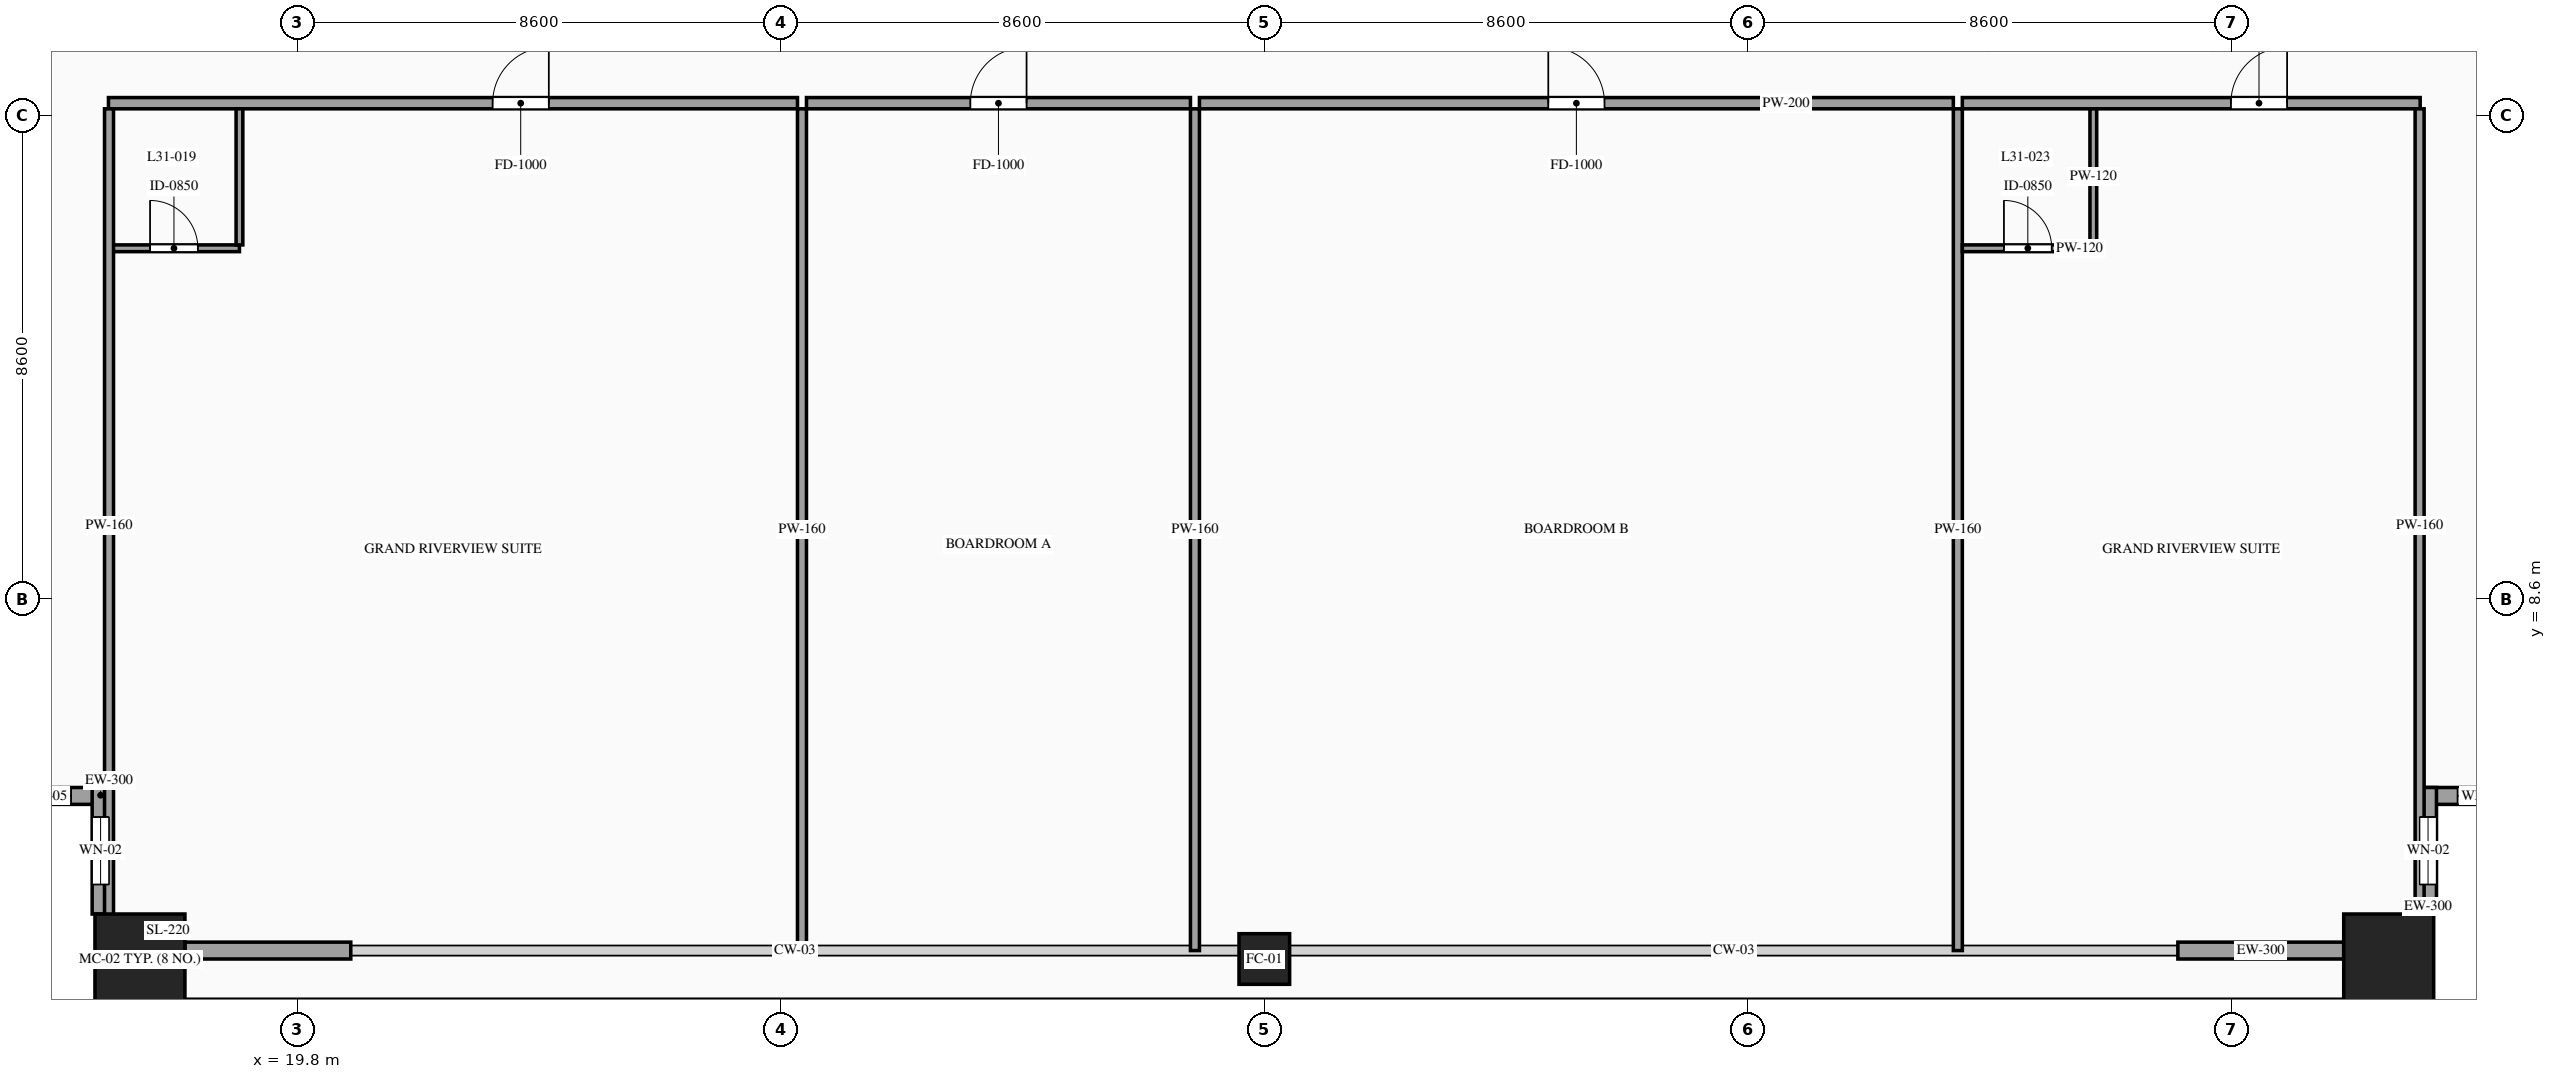
"""IFC4 building model, lengths in metres.
Left out: names, types, materials, properties, quantities, classifications, styles, units other than length and angle.
Written with IfcOpenShell. Run it as: python <this file> out.ifc"""

import sys

from ifc_helpers import new_model, si_unit, direction, frame, frame_2d, origin, origin_2d, place, context, subcontext, project, spatial, rectangle, hollow_rectangle, extrude, source, transform, mapped, element, fill, save


model = new_model("IFC4")
c1 = context("Model", 3, precision=1e-05, world=origin(), true_north=direction((0.0, 1.0)))
c2 = subcontext(c1, "Body", "Model", "MODEL_VIEW")
j1 = project(units=[si_unit("LENGTHUNIT", "METRE"), si_unit("PLANEANGLEUNIT", "RADIAN")], contexts=[c1])
p1 = place(None, origin())
s1 = spatial("IfcSite", under=j1, at=p1, CompositionType="ELEMENT")
p2 = place(p1, origin())
s2 = spatial("IfcBuilding", under=s1, at=p2, CompositionType="ELEMENT")
p3 = place(p2, frame((0.0, 0.0, 119.0)))
s3 = spatial("IfcBuildingStorey", under=s2, at=p3, CompositionType="ELEMENT", Elevation=119.0)
m1 = source(origin(), c2, "Body", "SweptSolid", [
    extrude(hollow_rectangle(XDim=1.6, YDim=1.6, WallThickness=0.07, at=origin_2d()), origin(), (0.0, 0.0, 1.0), 3.6),
])
p4 = place(p3, frame((17.0, 2.2, 0.0), z_axis=(0.0, 0.0, 1.0), x_axis=(1.0, 0.0, 0.0)))
e1 = element("IfcColumn", 1, at=p4, inside=s3, PredefinedType="COLUMN", context=c2, shape_type="MappedRepresentation", body=[
    mapped(m1, transform((0.0, 0.0, 0.0), scale=1.0)),
])
m2 = source(origin(), c2, "Body", "SweptSolid", [
    extrude(hollow_rectangle(XDim=0.9, YDim=0.9, WallThickness=0.042, at=origin_2d()), origin(), (0.0, 0.0, 1.0), 3.6),
])
p5 = place(p3, frame((37.0, 2.2, 0.0), z_axis=(0.0, 0.0, 1.0), x_axis=(1.0, 0.0, 0.0)))
e2 = element("IfcColumn", 2, at=p5, inside=s3, PredefinedType="COLUMN", context=c2, shape_type="MappedRepresentation", body=[
    mapped(m2, transform((0.0, 0.0, 0.0), scale=1.0)),
])
p6 = place(p3, frame((57.0, 2.2, 0.0), z_axis=(0.0, 0.0, 1.0), x_axis=(1.0, 0.0, 0.0)))
e3 = element("IfcColumn", 3, at=p6, inside=s3, PredefinedType="COLUMN", context=c2, shape_type="MappedRepresentation", body=[
    mapped(m1, transform((0.0, 0.0, 0.0), scale=1.0)),
])
p7 = place(p3, frame((14.2, 5.1, 0.0), z_axis=(0.0, 0.0, 1.0), x_axis=(1.0, 0.0, 0.0)))
e4 = element("IfcWall", 4, at=p7, inside=s3, PredefinedType="SOLIDWALL", context=c2, shape_type="SweptSolid", body=[
    extrude(rectangle(XDim=2.25, YDim=0.3, at=frame_2d((1.125, 0.0))), origin(), (0.0, 0.0, 1.0), 3.38),
])
p8 = place(p7, frame((0.675, 0.0, 0.85)))
e5 = element("IfcOpeningElement", 5, at=p8, cuts=e4, PredefinedType="OPENING", context=c2, shape_type="SweptSolid", body=[
    extrude(rectangle(XDim=0.9, YDim=1.5, at=frame_2d((0.45, 0.75))), frame((0.0, 0.165, 0.0), z_axis=(0.0, -1.0, 0.0), x_axis=(1.0, 0.0, 0.0)), (0.0, 0.0, 1.0), 0.33),
])
p9 = place(p3, frame((16.3, 5.25, 0.0), z_axis=(0.0, 0.0, 1.0), x_axis=(0.0, -1.0, 0.0)))
e6 = element("IfcWall", 6, at=p9, inside=s3, PredefinedType="SOLIDWALL", context=c2, shape_type="SweptSolid", body=[
    extrude(rectangle(XDim=2.25, YDim=0.3, at=frame_2d((1.125, 0.0))), origin(), (0.0, 0.0, 1.0), 3.38),
])
p10 = place(p9, frame((0.525, 0.0, 0.85)))
e7 = element("IfcOpeningElement", 7, at=p10, cuts=e6, PredefinedType="OPENING", context=c2, shape_type="SweptSolid", body=[
    extrude(rectangle(XDim=1.2, YDim=2.1, at=frame_2d((0.6, 1.05))), frame((0.0, 0.165, 0.0), z_axis=(0.0, -1.0, 0.0), x_axis=(1.0, 0.0, 0.0)), (0.0, 0.0, 1.0), 0.33),
])
p11 = place(p3, frame((57.55, 5.1, 0.0), z_axis=(0.0, 0.0, 1.0), x_axis=(1.0, 0.0, 0.0)))
e8 = element("IfcWall", 8, at=p11, inside=s3, PredefinedType="SOLIDWALL", context=c2, shape_type="SweptSolid", body=[
    extrude(rectangle(XDim=2.25, YDim=0.3, at=frame_2d((1.125, 0.0))), origin(), (0.0, 0.0, 1.0), 3.38),
])
p12 = place(p11, frame((0.675, 0.0, 0.85)))
e9 = element("IfcOpeningElement", 9, at=p12, cuts=e8, PredefinedType="OPENING", context=c2, shape_type="SweptSolid", body=[
    extrude(rectangle(XDim=0.9, YDim=1.5, at=frame_2d((0.45, 0.75))), frame((0.0, 0.165, 0.0), z_axis=(0.0, -1.0, 0.0), x_axis=(1.0, 0.0, 0.0)), (0.0, 0.0, 1.0), 0.33),
])
p13 = place(p3, frame((57.7, 3.0, 0.0), z_axis=(0.0, 0.0, 1.0), x_axis=(0.0, 1.0, 0.0)))
e10 = element("IfcWall", 10, at=p13, inside=s3, PredefinedType="SOLIDWALL", context=c2, shape_type="SweptSolid", body=[
    extrude(rectangle(XDim=2.25, YDim=0.3, at=frame_2d((1.125, 0.0))), origin(), (0.0, 0.0, 1.0), 3.38),
])
p14 = place(p13, frame((0.525, 0.0, 0.85)))
e11 = element("IfcOpeningElement", 11, at=p14, cuts=e10, PredefinedType="OPENING", context=c2, shape_type="SweptSolid", body=[
    extrude(rectangle(XDim=1.2, YDim=2.1, at=frame_2d((0.6, 1.05))), frame((0.0, 0.165, 0.0), z_axis=(0.0, -1.0, 0.0), x_axis=(1.0, 0.0, 0.0)), (0.0, 0.0, 1.0), 0.33),
])
m3 = source(origin(), c2, "Body", "SweptSolid", [
    extrude(rectangle(XDim=2.95, YDim=0.3, at=frame_2d((1.475, 0.0))), origin(), (0.0, 0.0, 1.0), 2.775),
])
for number, where, z_axis, x_axis in (
    (12, (17.8, 2.35, 0.0), (0.0, 0.0, 1.0), (1.0, 0.0, 0.0)),
    (13, (53.25, 2.35, 0.0), (0.0, 0.0, 1.0), (1.0, 0.0, 0.0)),
):
    element("IfcWall", number, at=place(p3, frame(where, z_axis=z_axis, x_axis=x_axis)), inside=s3, PredefinedType="SOLIDWALL", context=c2, shape_type="MappedRepresentation", body=[
        mapped(m3, transform((0.0, 0.0, 0.0), scale=1.0)),
    ])
p15 = place(p3, frame((16.44, 17.42, 0.0), z_axis=(0.0, 0.0, 1.0), x_axis=(1.0, 0.0, 0.0)))
e14 = element("IfcWall", 14, at=p15, inside=s3, PredefinedType="PARTITIONING", context=c2, shape_type="SweptSolid", body=[
    extrude(rectangle(XDim=12.256, YDim=0.2, at=frame_2d((6.128, 0.0))), origin(), (0.0, 0.0, 1.0), 3.38),
])
p16 = place(p15, frame((6.833, 0.0, 0.0)))
e15 = element("IfcOpeningElement", 15, at=p16, cuts=e14, PredefinedType="OPENING", context=c2, shape_type="SweptSolid", body=[
    extrude(rectangle(XDim=1.0, YDim=2.2, at=frame_2d((0.5, 1.1))), frame((0.0, 0.115, 0.0), z_axis=(0.0, -1.0, 0.0), x_axis=(1.0, 0.0, 0.0)), (0.0, 0.0, 1.0), 0.23),
])
m4 = source(origin(), c2, "Body", "SweptSolid", [
    extrude(rectangle(XDim=14.97, YDim=0.16, at=frame_2d((7.485, 0.0))), origin(), (0.0, 0.0, 1.0), 3.38),
])
p17 = place(p3, frame((28.776, 2.35, 0.0), z_axis=(0.0, 0.0, 1.0), x_axis=(0.0, 1.0, 0.0)))
e16 = element("IfcWall", 16, at=p17, inside=s3, PredefinedType="PARTITIONING", context=c2, shape_type="MappedRepresentation", body=[
    mapped(m4, transform((0.0, 0.0, 0.0), scale=1.0)),
])
p18 = place(p3, frame((16.44, 14.84, 0.0), z_axis=(0.0, 0.0, 1.0), x_axis=(1.0, 0.0, 0.0)))
e17 = element("IfcWall", 17, at=p18, inside=s3, PredefinedType="PARTITIONING", context=c2, shape_type="SweptSolid", body=[
    extrude(rectangle(XDim=2.33, YDim=0.12, at=frame_2d((1.165, 0.0))), origin(), (0.0, 0.0, 1.0), 3.38),
])
p19 = place(p18, frame((0.74, 0.0, 0.0)))
e18 = element("IfcOpeningElement", 18, at=p19, cuts=e17, PredefinedType="OPENING", context=c2, shape_type="SweptSolid", body=[
    extrude(rectangle(XDim=0.85, YDim=2.1, at=frame_2d((0.425, 1.05))), frame((0.0, 0.075, 0.0), z_axis=(0.0, -1.0, 0.0), x_axis=(1.0, 0.0, 0.0)), (0.0, 0.0, 1.0), 0.15),
])
m5 = source(origin(), c2, "Body", "SweptSolid", [
    extrude(rectangle(XDim=2.42, YDim=0.12, at=frame_2d((1.21, 0.0))), origin(), (0.0, 0.0, 1.0), 3.38),
])
p20 = place(p3, frame((18.77, 14.9, 0.0), z_axis=(0.0, 0.0, 1.0), x_axis=(0.0, 1.0, 0.0)))
e19 = element("IfcWall", 19, at=p20, inside=s3, PredefinedType="PARTITIONING", context=c2, shape_type="MappedRepresentation", body=[
    mapped(m5, transform((0.0, 0.0, 0.0), scale=1.0)),
])
p21 = place(p3, frame((28.856, 17.42, 0.0), z_axis=(0.0, 0.0, 1.0), x_axis=(1.0, 0.0, 0.0)))
e20 = element("IfcWall", 20, at=p21, inside=s3, PredefinedType="PARTITIONING", context=c2, shape_type="SweptSolid", body=[
    extrude(rectangle(XDim=6.83, YDim=0.2, at=frame_2d((3.415, 0.0))), origin(), (0.0, 0.0, 1.0), 3.38),
])
p22 = place(p21, frame((2.915, 0.0, 0.0)))
e21 = element("IfcOpeningElement", 21, at=p22, cuts=e20, PredefinedType="OPENING", context=c2, shape_type="SweptSolid", body=[
    extrude(rectangle(XDim=1.0, YDim=2.2, at=frame_2d((0.5, 1.1))), frame((0.0, 0.115, 0.0), z_axis=(0.0, -1.0, 0.0), x_axis=(1.0, 0.0, 0.0)), (0.0, 0.0, 1.0), 0.23),
])
p23 = place(p3, frame((35.766, 2.35, 0.0), z_axis=(0.0, 0.0, 1.0), x_axis=(0.0, 1.0, 0.0)))
e22 = element("IfcWall", 22, at=p23, inside=s3, PredefinedType="PARTITIONING", context=c2, shape_type="MappedRepresentation", body=[
    mapped(m4, transform((0.0, 0.0, 0.0), scale=1.0)),
])
p24 = place(p3, frame((35.846, 17.42, 0.0), z_axis=(0.0, 0.0, 1.0), x_axis=(1.0, 0.0, 0.0)))
e23 = element("IfcWall", 23, at=p24, inside=s3, PredefinedType="PARTITIONING", context=c2, shape_type="SweptSolid", body=[
    extrude(rectangle(XDim=13.41, YDim=0.2, at=frame_2d((6.705, 0.0))), origin(), (0.0, 0.0, 1.0), 3.38),
])
p25 = place(p24, frame((6.205, 0.0, 0.0)))
e24 = element("IfcOpeningElement", 24, at=p25, cuts=e23, PredefinedType="OPENING", context=c2, shape_type="SweptSolid", body=[
    extrude(rectangle(XDim=1.0, YDim=2.2, at=frame_2d((0.5, 1.1))), frame((0.0, 0.115, 0.0), z_axis=(0.0, -1.0, 0.0), x_axis=(1.0, 0.0, 0.0)), (0.0, 0.0, 1.0), 0.23),
])
p26 = place(p3, frame((49.336, 2.35, 0.0), z_axis=(0.0, 0.0, 1.0), x_axis=(0.0, 1.0, 0.0)))
e25 = element("IfcWall", 25, at=p26, inside=s3, PredefinedType="PARTITIONING", context=c2, shape_type="MappedRepresentation", body=[
    mapped(m4, transform((0.0, 0.0, 0.0), scale=1.0)),
])
p27 = place(p3, frame((49.416, 17.42, 0.0), z_axis=(0.0, 0.0, 1.0), x_axis=(1.0, 0.0, 0.0)))
e26 = element("IfcWall", 26, at=p27, inside=s3, PredefinedType="PARTITIONING", context=c2, shape_type="SweptSolid", body=[
    extrude(rectangle(XDim=8.144, YDim=0.2, at=frame_2d((4.072, 0.0))), origin(), (0.0, 0.0, 1.0), 3.38),
])
p28 = place(p27, frame((4.777, 0.0, 0.0)))
e27 = element("IfcOpeningElement", 27, at=p28, cuts=e26, PredefinedType="OPENING", context=c2, shape_type="SweptSolid", body=[
    extrude(rectangle(XDim=1.0, YDim=2.2, at=frame_2d((0.5, 1.1))), frame((0.0, 0.115, 0.0), z_axis=(0.0, -1.0, 0.0), x_axis=(1.0, 0.0, 0.0)), (0.0, 0.0, 1.0), 0.23),
])
m6 = source(origin(), c2, "Body", "SweptSolid", [
    extrude(rectangle(XDim=14.82, YDim=0.16, at=frame_2d((7.41, 0.0))), origin(), (0.0, 0.0, 1.0), 3.38),
])
for number, where, z_axis, x_axis in (
    (28, (16.45, 2.5, 0.0), (0.0, 0.0, 1.0), (0.0, 1.0, 0.0)),
    (29, (57.55, 2.5, 0.0), (0.0, 0.0, 1.0), (0.0, 1.0, 0.0)),
):
    element("IfcWall", number, at=place(p3, frame(where, z_axis=z_axis, x_axis=x_axis)), inside=s3, PredefinedType="PARTITIONING", context=c2, shape_type="MappedRepresentation", body=[
        mapped(m6, transform((0.0, 0.0, 0.0), scale=1.0)),
    ])
p29 = place(p3, frame((49.416, 14.84, 0.0), z_axis=(0.0, 0.0, 1.0), x_axis=(1.0, 0.0, 0.0)))
e30 = element("IfcWall", 30, at=p29, inside=s3, PredefinedType="PARTITIONING", context=c2, shape_type="SweptSolid", body=[
    extrude(rectangle(XDim=2.33, YDim=0.12, at=frame_2d((1.165, 0.0))), origin(), (0.0, 0.0, 1.0), 3.38),
])
p30 = place(p29, frame((0.74, 0.0, 0.0)))
e31 = element("IfcOpeningElement", 31, at=p30, cuts=e30, PredefinedType="OPENING", context=c2, shape_type="SweptSolid", body=[
    extrude(rectangle(XDim=0.85, YDim=2.1, at=frame_2d((0.425, 1.05))), frame((0.0, 0.075, 0.0), z_axis=(0.0, -1.0, 0.0), x_axis=(1.0, 0.0, 0.0)), (0.0, 0.0, 1.0), 0.15),
])
p31 = place(p3, frame((51.746, 14.9, 0.0), z_axis=(0.0, 0.0, 1.0), x_axis=(0.0, 1.0, 0.0)))
e32 = element("IfcWall", 32, at=p31, inside=s3, PredefinedType="PARTITIONING", context=c2, shape_type="MappedRepresentation", body=[
    mapped(m5, transform((0.0, 0.0, 0.0), scale=1.0)),
])
m7 = source(origin(), c2, "Body", "SweptSolid", [
    extrude(rectangle(XDim=0.9, YDim=1.5, at=frame_2d((0.45, 0.75))), frame((0.0, 0.03, 0.0), z_axis=(0.0, -1.0, 0.0), x_axis=(1.0, 0.0, 0.0)), (0.0, 0.0, 1.0), 0.06),
])
p32 = place(p8, origin())
e33 = element("IfcWindow", 33, at=p32, inside=s3, PartitioningType="SINGLE_PANEL", PredefinedType="WINDOW", context=c2, shape_type="MappedRepresentation", body=[
    mapped(m7, transform((0.0, 0.0, 0.0), scale=1.0)),
])
fill(e5, e33)
m8 = source(origin(), c2, "Body", "SweptSolid", [
    extrude(rectangle(XDim=1.2, YDim=2.1, at=frame_2d((0.6, 1.05))), frame((0.0, 0.03, 0.0), z_axis=(0.0, -1.0, 0.0), x_axis=(1.0, 0.0, 0.0)), (0.0, 0.0, 1.0), 0.06),
])
p33 = place(p10, origin())
e34 = element("IfcWindow", 34, at=p33, inside=s3, PartitioningType="SINGLE_PANEL", PredefinedType="WINDOW", context=c2, shape_type="MappedRepresentation", body=[
    mapped(m8, transform((0.0, 0.0, 0.0), scale=1.0)),
])
fill(e7, e34)
p34 = place(p12, origin())
e35 = element("IfcWindow", 35, at=p34, inside=s3, PartitioningType="SINGLE_PANEL", PredefinedType="WINDOW", context=c2, shape_type="MappedRepresentation", body=[
    mapped(m7, transform((0.0, 0.0, 0.0), scale=1.0)),
])
fill(e9, e35)
p35 = place(p14, origin())
e36 = element("IfcWindow", 36, at=p35, inside=s3, PartitioningType="SINGLE_PANEL", PredefinedType="WINDOW", context=c2, shape_type="MappedRepresentation", body=[
    mapped(m8, transform((0.0, 0.0, 0.0), scale=1.0)),
])
fill(e11, e36)
m9 = source(origin(), c2, "Body", "SweptSolid", [
    extrude(rectangle(XDim=1.0, YDim=2.2, at=frame_2d((0.5, 1.1))), frame((0.0, 0.025, 0.0), z_axis=(0.0, -1.0, 0.0), x_axis=(1.0, 0.0, 0.0)), (0.0, 0.0, 1.0), 0.05),
])
p36 = place(p16, origin())
e37 = element("IfcDoor", 37, at=p36, inside=s3, OperationType="SINGLE_SWING_RIGHT", PredefinedType="DOOR", context=c2, shape_type="MappedRepresentation", body=[
    mapped(m9, transform((0.0, 0.0, 0.0), scale=1.0)),
])
fill(e15, e37)
m10 = source(origin(), c2, "Body", "SweptSolid", [
    extrude(rectangle(XDim=0.85, YDim=2.1, at=frame_2d((0.425, 1.05))), frame((0.0, 0.025, 0.0), z_axis=(0.0, -1.0, 0.0), x_axis=(1.0, 0.0, 0.0)), (0.0, 0.0, 1.0), 0.05),
])
p37 = place(p19, origin())
e38 = element("IfcDoor", 38, at=p37, inside=s3, OperationType="SINGLE_SWING_LEFT", PredefinedType="DOOR", context=c2, shape_type="MappedRepresentation", body=[
    mapped(m10, transform((0.0, 0.0, 0.0), scale=1.0)),
])
fill(e18, e38)
p38 = place(p22, origin())
e39 = element("IfcDoor", 39, at=p38, inside=s3, OperationType="SINGLE_SWING_RIGHT", PredefinedType="DOOR", context=c2, shape_type="MappedRepresentation", body=[
    mapped(m9, transform((0.0, 0.0, 0.0), scale=1.0)),
])
fill(e21, e39)
p39 = place(p25, origin())
e40 = element("IfcDoor", 40, at=p39, inside=s3, OperationType="SINGLE_SWING_LEFT", PredefinedType="DOOR", context=c2, shape_type="MappedRepresentation", body=[
    mapped(m9, transform((0.0, 0.0, 0.0), scale=1.0)),
])
fill(e24, e40)
p40 = place(p28, origin())
e41 = element("IfcDoor", 41, at=p40, inside=s3, OperationType="SINGLE_SWING_RIGHT", PredefinedType="DOOR", context=c2, shape_type="MappedRepresentation", body=[
    mapped(m9, transform((0.0, 0.0, 0.0), scale=1.0)),
])
fill(e27, e41)
p41 = place(p30, origin())
e42 = element("IfcDoor", 42, at=p41, inside=s3, OperationType="SINGLE_SWING_LEFT", PredefinedType="DOOR", context=c2, shape_type="MappedRepresentation", body=[
    mapped(m10, transform((0.0, 0.0, 0.0), scale=1.0)),
])
fill(e31, e42)
save(model, sys.argv[1])
